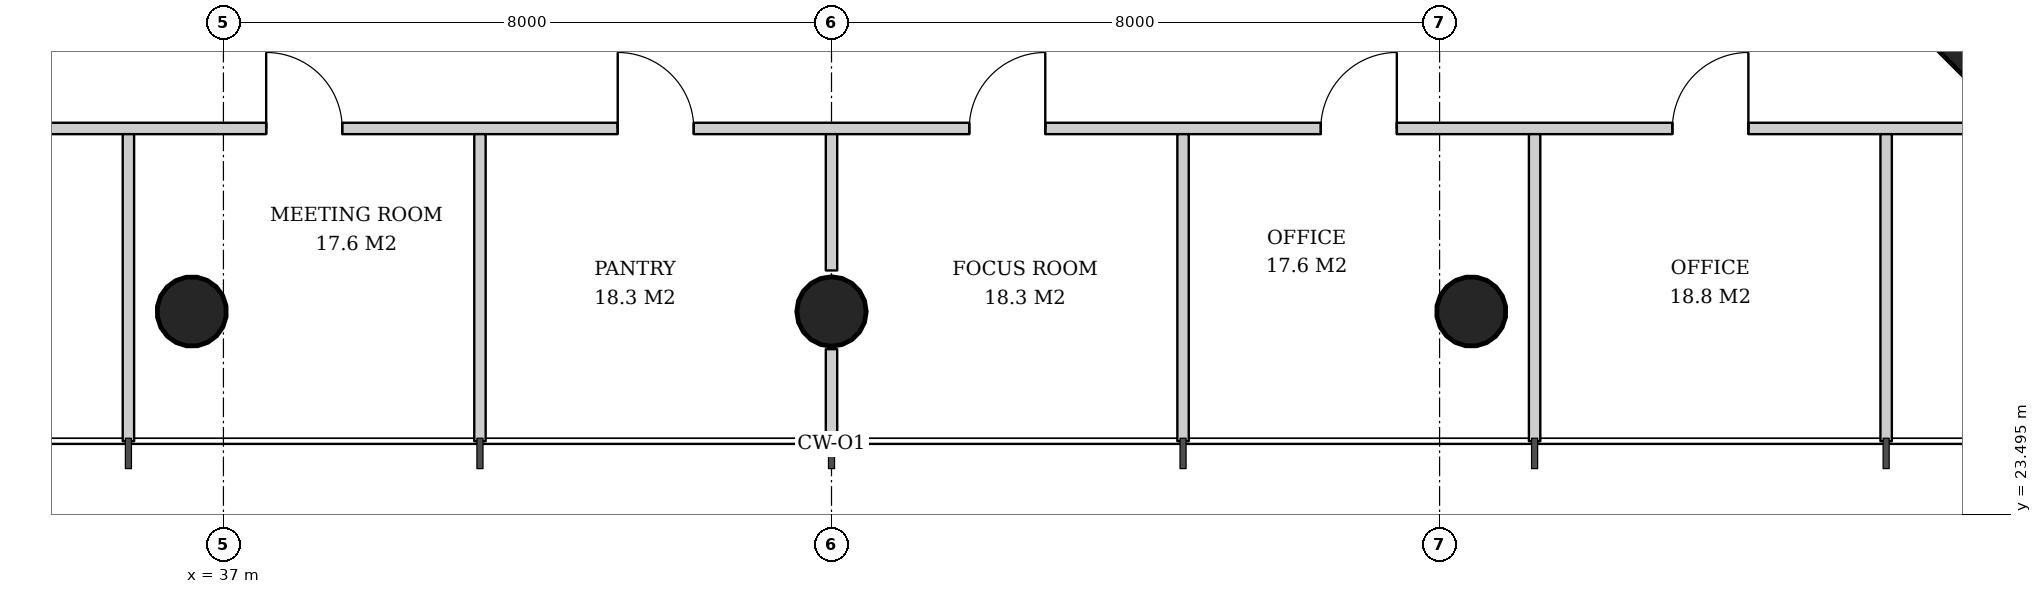
"""IFC4 building model, lengths in metres.
Left out: names, types, materials, properties, quantities, classifications, styles, units other than length and angle.
Written with IfcOpenShell. Run it as: python <this file> out.ifc"""

import sys

from ifc_helpers import new_model, si_unit, direction, frame, frame_2d, origin, origin_2d, place, context, subcontext, project, spatial, rectangle, hollow_circle, extrude, element, fill, save


model = new_model("IFC4")
c1 = context("Model", 3, precision=1e-05, world=origin(), true_north=direction((0.0, 1.0)))
c2 = subcontext(c1, "Body", "Model", "MODEL_VIEW")
j1 = project(units=[si_unit("LENGTHUNIT", "METRE"), si_unit("PLANEANGLEUNIT", "RADIAN")], contexts=[c1])
p1 = place(None, origin())
s1 = spatial("IfcSite", under=j1, at=p1, CompositionType="ELEMENT")
p2 = place(p1, origin())
s2 = spatial("IfcBuilding", under=s1, at=p2, CompositionType="ELEMENT")
p3 = place(p2, frame((0.0, 0.0, 150.2)))
s3 = spatial("IfcBuildingStorey", under=s2, at=p3, CompositionType="ELEMENT", Elevation=150.2)
p4 = place(p3, frame((60.771, 30.229, 0.0), z_axis=(-0.031962158256, 0.031962158256, 0.998977898093), x_axis=(-0.707106781187, -0.707106781187, 0.0)))
e1 = element("IfcColumn", 1, at=p4, inside=s3, PredefinedType="COLUMN", context=c2, shape_type="SweptSolid", body=[
    extrude(rectangle(XDim=2.6, YDim=2.6, at=origin_2d()), origin(), (0.0, 0.0, 1.0), 3.804),
])
p5 = place(p3, frame((36.564, 26.129, 0.0), z_axis=(0.015987237665, 0.031910269556, 0.999362868496), x_axis=(-0.894067115991, 0.447933021895, 0.0)))
e2 = element("IfcColumn", 2, at=p5, inside=s3, PredefinedType="COLUMN", context=c2, shape_type="SweptSolid", body=[
    extrude(hollow_circle(Radius=0.457, WallThickness=0.03, at=origin_2d()), origin(), (0.0, 0.0, 1.0), 3.802),
])
p6 = place(p3, frame((45.0, 26.129, 0.0), z_axis=(0.0, 0.031914348339, 0.999490607445), x_axis=(-1.0, 0.0, 0.0)))
e3 = element("IfcColumn", 3, at=p6, inside=s3, PredefinedType="COLUMN", context=c2, shape_type="SweptSolid", body=[
    extrude(hollow_circle(Radius=0.457, WallThickness=0.03, at=origin_2d()), origin(), (0.0, 0.0, 1.0), 3.802),
])
p7 = place(p3, frame((53.436, 26.129, 0.0), z_axis=(-0.015987237665, 0.031910269556, 0.999362868496), x_axis=(-0.894067115991, -0.447933021895, 0.0)))
e4 = element("IfcColumn", 4, at=p7, inside=s3, PredefinedType="COLUMN", context=c2, shape_type="SweptSolid", body=[
    extrude(hollow_circle(Radius=0.457, WallThickness=0.03, at=origin_2d()), origin(), (0.0, 0.0, 1.0), 3.802),
])
p8 = place(p3, frame((29.489, 28.575, 0.0), z_axis=(0.0, 0.0, 1.0), x_axis=(1.0, 0.0, 0.0)))
e5 = element("IfcWall", 5, at=p8, inside=s3, PredefinedType="PARTITIONING", context=c2, shape_type="SweptSolid", body=[
    extrude(rectangle(XDim=31.023, YDim=0.15, at=frame_2d((15.511, 0.0))), origin(), (0.0, 0.0, 1.0), 2.72),
])
p9 = place(p8, frame((3.449, 0.0, 0.0)))
e6 = element("IfcOpeningElement", 6, at=p9, cuts=e5, PredefinedType="OPENING", context=c2, shape_type="SweptSolid", body=[
    extrude(rectangle(XDim=1.0, YDim=2.1, at=frame_2d((0.5, 1.05))), frame((0.0, 0.085, 0.0), z_axis=(0.0, -1.0, 0.0), x_axis=(1.0, 0.0, 0.0)), (0.0, 0.0, 1.0), 0.17),
])
p10 = place(p8, frame((8.074, 0.0, 0.0)))
e7 = element("IfcOpeningElement", 7, at=p10, cuts=e5, PredefinedType="OPENING", context=c2, shape_type="SweptSolid", body=[
    extrude(rectangle(XDim=1.0, YDim=2.1, at=frame_2d((0.5, 1.05))), frame((0.0, 0.085, 0.0), z_axis=(0.0, -1.0, 0.0), x_axis=(1.0, 0.0, 0.0)), (0.0, 0.0, 1.0), 0.17),
])
p11 = place(p8, frame((12.699, 0.0, 0.0)))
e8 = element("IfcOpeningElement", 8, at=p11, cuts=e5, PredefinedType="OPENING", context=c2, shape_type="SweptSolid", body=[
    extrude(rectangle(XDim=1.0, YDim=2.1, at=frame_2d((0.5, 1.05))), frame((0.0, 0.085, 0.0), z_axis=(0.0, -1.0, 0.0), x_axis=(1.0, 0.0, 0.0)), (0.0, 0.0, 1.0), 0.17),
])
p12 = place(p8, frame((17.324, 0.0, 0.0)))
e9 = element("IfcOpeningElement", 9, at=p12, cuts=e5, PredefinedType="OPENING", context=c2, shape_type="SweptSolid", body=[
    extrude(rectangle(XDim=1.0, YDim=2.1, at=frame_2d((0.5, 1.05))), frame((0.0, 0.085, 0.0), z_axis=(0.0, -1.0, 0.0), x_axis=(1.0, 0.0, 0.0)), (0.0, 0.0, 1.0), 0.17),
])
p13 = place(p8, frame((21.949, 0.0, 0.0)))
e10 = element("IfcOpeningElement", 10, at=p13, cuts=e5, PredefinedType="OPENING", context=c2, shape_type="SweptSolid", body=[
    extrude(rectangle(XDim=1.0, YDim=2.1, at=frame_2d((0.5, 1.05))), frame((0.0, 0.085, 0.0), z_axis=(0.0, -1.0, 0.0), x_axis=(1.0, 0.0, 0.0)), (0.0, 0.0, 1.0), 0.17),
])
p14 = place(p8, frame((26.574, 0.0, 0.0)))
e11 = element("IfcOpeningElement", 11, at=p14, cuts=e5, PredefinedType="OPENING", context=c2, shape_type="SweptSolid", body=[
    extrude(rectangle(XDim=1.0, YDim=2.1, at=frame_2d((0.5, 1.05))), frame((0.0, 0.085, 0.0), z_axis=(0.0, -1.0, 0.0), x_axis=(1.0, 0.0, 0.0)), (0.0, 0.0, 1.0), 0.17),
])
for number, where, z_axis, x_axis in (
    (12, (35.75, 28.5, 0.0), (0.0, 0.0, 1.0), (0.0, -1.0, 0.0)),
    (13, (40.375, 28.5, 0.0), (0.0, 0.0, 1.0), (0.0, -1.0, 0.0)),
):
    element("IfcWall", number, at=place(p3, frame(where, z_axis=z_axis, x_axis=x_axis)), inside=s3, PredefinedType="PARTITIONING", context=c2, shape_type="SweptSolid", body=[
        extrude(rectangle(XDim=4.04, YDim=0.15, at=frame_2d((2.02, 0.0))), origin(), (0.0, 0.0, 1.0), 2.82),
    ])
p15 = place(p3, frame((45.0, 28.5, 0.0), z_axis=(0.0, 0.0, 1.0), x_axis=(0.0, -1.0, 0.0)))
e14 = element("IfcWall", 14, at=p15, inside=s3, PredefinedType="PARTITIONING", context=c2, shape_type="SweptSolid", body=[
    extrude(rectangle(XDim=1.793, YDim=0.15, at=frame_2d((0.896, 0.0))), origin(), (0.0, 0.0, 1.0), 3.62),
])
p16 = place(p3, frame((45.0, 25.672, 0.0), z_axis=(0.0, 0.0, 1.0), x_axis=(0.0, -1.0, 0.0)))
e15 = element("IfcWall", 15, at=p16, inside=s3, PredefinedType="PARTITIONING", context=c2, shape_type="SweptSolid", body=[
    extrude(rectangle(XDim=1.212, YDim=0.15, at=frame_2d((0.606, 0.0))), origin(), (0.0, 0.0, 1.0), 3.62),
])
for number, where, z_axis, x_axis in (
    (16, (49.625, 28.5, 0.0), (0.0, 0.0, 1.0), (0.0, -1.0, 0.0)),
    (17, (54.25, 28.5, 0.0), (0.0, 0.0, 1.0), (0.0, -1.0, 0.0)),
    (18, (58.875, 28.5, 0.0), (0.0, 0.0, 1.0), (0.0, -1.0, 0.0)),
):
    element("IfcWall", number, at=place(p3, frame(where, z_axis=z_axis, x_axis=x_axis)), inside=s3, PredefinedType="PARTITIONING", context=c2, shape_type="SweptSolid", body=[
        extrude(rectangle(XDim=4.04, YDim=0.15, at=frame_2d((2.02, 0.0))), origin(), (0.0, 0.0, 1.0), 2.82),
    ])
p17 = place(p10, origin())
e19 = element("IfcDoor", 19, at=p17, inside=s3, OperationType="SINGLE_SWING_LEFT", PredefinedType="DOOR", context=c2, shape_type="SweptSolid", body=[
    extrude(rectangle(XDim=1.0, YDim=2.1, at=frame_2d((0.5, 1.05))), frame((0.0, 0.025, 0.0), z_axis=(0.0, -1.0, 0.0), x_axis=(1.0, 0.0, 0.0)), (0.0, 0.0, 1.0), 0.05),
])
fill(e7, e19)
p18 = place(p11, origin())
e20 = element("IfcDoor", 20, at=p18, inside=s3, OperationType="SINGLE_SWING_LEFT", PredefinedType="DOOR", context=c2, shape_type="SweptSolid", body=[
    extrude(rectangle(XDim=1.0, YDim=2.1, at=frame_2d((0.5, 1.05))), frame((0.0, 0.025, 0.0), z_axis=(0.0, -1.0, 0.0), x_axis=(1.0, 0.0, 0.0)), (0.0, 0.0, 1.0), 0.05),
])
fill(e8, e20)
p19 = place(p12, origin())
e21 = element("IfcDoor", 21, at=p19, inside=s3, OperationType="SINGLE_SWING_RIGHT", PredefinedType="DOOR", context=c2, shape_type="SweptSolid", body=[
    extrude(rectangle(XDim=1.0, YDim=2.1, at=frame_2d((0.5, 1.05))), frame((0.0, 0.025, 0.0), z_axis=(0.0, -1.0, 0.0), x_axis=(1.0, 0.0, 0.0)), (0.0, 0.0, 1.0), 0.05),
])
fill(e9, e21)
p20 = place(p13, origin())
e22 = element("IfcDoor", 22, at=p20, inside=s3, OperationType="SINGLE_SWING_RIGHT", PredefinedType="DOOR", context=c2, shape_type="SweptSolid", body=[
    extrude(rectangle(XDim=1.0, YDim=2.1, at=frame_2d((0.5, 1.05))), frame((0.0, 0.025, 0.0), z_axis=(0.0, -1.0, 0.0), x_axis=(1.0, 0.0, 0.0)), (0.0, 0.0, 1.0), 0.05),
])
fill(e10, e22)
p21 = place(p14, origin())
e23 = element("IfcDoor", 23, at=p21, inside=s3, OperationType="SINGLE_SWING_RIGHT", PredefinedType="DOOR", context=c2, shape_type="SweptSolid", body=[
    extrude(rectangle(XDim=1.0, YDim=2.1, at=frame_2d((0.5, 1.05))), frame((0.0, 0.025, 0.0), z_axis=(0.0, -1.0, 0.0), x_axis=(1.0, 0.0, 0.0)), (0.0, 0.0, 1.0), 0.05),
])
fill(e11, e23)
save(model, sys.argv[1])
